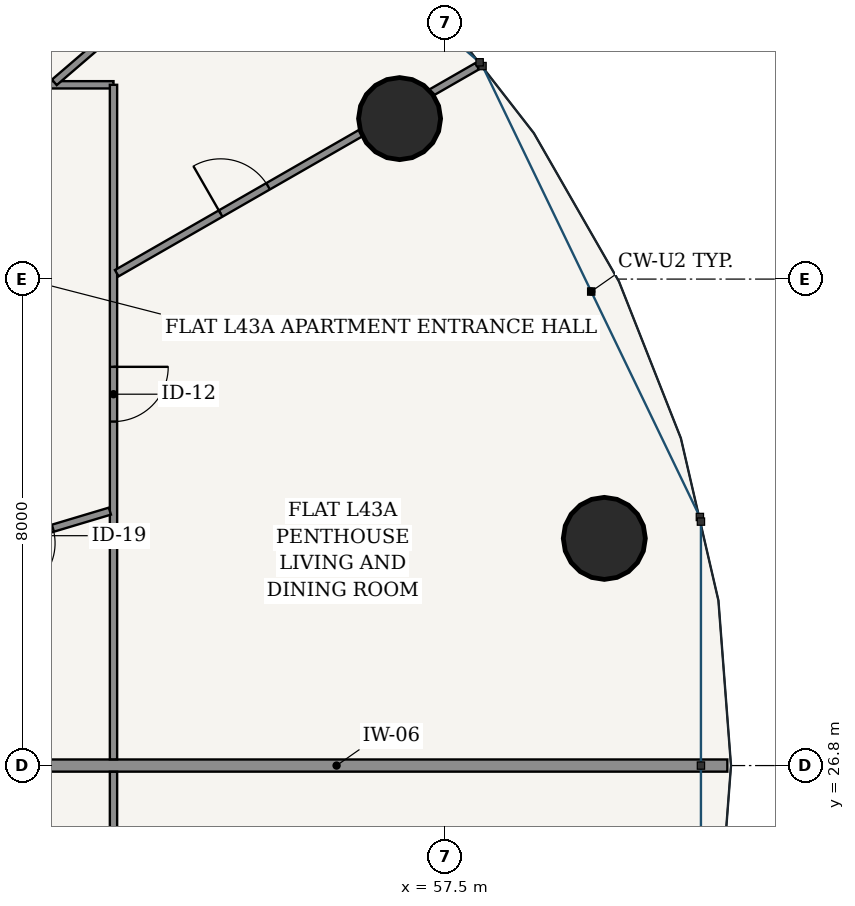
"""IFC4 building model, lengths in metres.
Left out: names, types, materials, properties, quantities, classifications, styles, units other than length and angle.
Written with IfcOpenShell. Run it as: python <this file> out.ifc"""

import sys

from ifc_helpers import new_model, si_unit, direction, frame, frame_2d, origin, origin_2d, place, context, subcontext, project, spatial, rectangle, hollow_circle, extrude, source, transform, mapped, element, fill, save


model = new_model("IFC4")
c1 = context("Model", 3, precision=1e-05, world=origin(), true_north=direction((-0.2419218956, 0.970295726276)))
c2 = subcontext(c1, "Body", "Model", "MODEL_VIEW")
j1 = project(units=[si_unit("LENGTHUNIT", "METRE"), si_unit("PLANEANGLEUNIT", "RADIAN")], contexts=[c1])
p1 = place(None, origin())
s1 = spatial("IfcSite", under=j1, at=p1, CompositionType="ELEMENT")
p2 = place(p1, origin())
s2 = spatial("IfcBuilding", under=s1, at=p2, CompositionType="ELEMENT")
p3 = place(p2, frame((0.0, 0.0, 164.2)))
s3 = spatial("IfcBuildingStorey", under=s2, at=p3, CompositionType="ELEMENT", Elevation=164.2)
for number, where, z_axis, x_axis in (
    (1, (60.117, 30.536, 0.0), (0.0, 0.0, 1.0), (1.0, 0.0, 0.0)),
    (2, (56.75, 37.439, 0.0), (0.0, 0.0, 1.0), (1.0, 0.0, 0.0)),
):
    element("IfcColumn", number, at=place(p3, frame(where, z_axis=z_axis, x_axis=x_axis)), inside=s3, PredefinedType="COLUMN", context=c2, shape_type="SweptSolid", body=[
        extrude(hollow_circle(Radius=0.675, WallThickness=0.042, at=origin_2d()), origin(), (0.0, 0.0, 1.0), 3.6),
    ])
p4 = place(p3, frame((49.287, 26.8, 0.0), z_axis=(0.0, 0.0, 1.0), x_axis=(1.0, 0.0, 0.0)))
e3 = element("IfcWall", 3, at=p4, inside=s3, PredefinedType="PARTITIONING", context=c2, shape_type="SweptSolid", body=[
    extrude(rectangle(XDim=12.853, YDim=0.2, at=frame_2d((6.426, 0.0))), origin(), (0.0, 0.0, 1.0), 2.846),
])
p5 = place(p3, frame((44.355, 37.995, 0.0), z_axis=(0.0, 0.0, 1.0), x_axis=(1.0, 0.0, 0.0)))
e4 = element("IfcWall", 4, at=p5, inside=s3, PredefinedType="PARTITIONING", context=c2, shape_type="SweptSolid", body=[
    extrude(rectangle(XDim=7.69, YDim=0.12, at=frame_2d((3.845, 0.0))), origin(), (0.0, 0.0, 1.0), 2.776),
])
p6 = place(p5, frame((0.887, 0.0, 0.0)))
e5 = element("IfcOpeningElement", 5, at=p6, cuts=e4, PredefinedType="OPENING", context=c2, shape_type="SweptSolid", body=[
    extrude(rectangle(XDim=0.9, YDim=2.15, at=frame_2d((0.45, 1.075))), frame((0.0, 0.07, 0.0), z_axis=(0.0, -1.0, 0.0), x_axis=(1.0, 0.0, 0.0)), (0.0, 0.0, 1.0), 0.14),
])
p7 = place(p3, frame((52.045, 37.995, 0.0), z_axis=(0.0, 0.0, 1.0), x_axis=(0.0, -1.0, 0.0)))
e6 = element("IfcWall", 6, at=p7, inside=s3, PredefinedType="PARTITIONING", context=c2, shape_type="SweptSolid", body=[
    extrude(rectangle(XDim=11.093, YDim=0.12, at=frame_2d((5.546, 0.0))), origin(), (0.0, 0.0, 1.0), 2.776),
])
p8 = place(p7, frame((4.638, 0.0, 0.0)))
e7 = element("IfcOpeningElement", 7, at=p8, cuts=e6, PredefinedType="OPENING", context=c2, shape_type="SweptSolid", body=[
    extrude(rectangle(XDim=0.9, YDim=2.15, at=frame_2d((0.45, 1.075))), frame((0.0, 0.07, 0.0), z_axis=(0.0, -1.0, 0.0), x_axis=(1.0, 0.0, 0.0)), (0.0, 0.0, 1.0), 0.14),
])
p9 = place(p3, frame((52.099, 34.897, 0.0), z_axis=(0.0, 0.0, 1.0), x_axis=(0.867170536447, 0.498011305813, 0.0)))
e8 = element("IfcWall", 8, at=p9, inside=s3, PredefinedType="PARTITIONING", context=c2, shape_type="SweptSolid", body=[
    extrude(rectangle(XDim=6.834, YDim=0.12, at=frame_2d((3.417, 0.0))), origin(), (0.0, 0.0, 1.0), 2.776),
])
p10 = place(p9, frame((1.969, 0.0, 0.0)))
e9 = element("IfcOpeningElement", 9, at=p10, cuts=e8, PredefinedType="OPENING", context=c2, shape_type="SweptSolid", body=[
    extrude(rectangle(XDim=0.9, YDim=2.15, at=frame_2d((0.45, 1.075))), frame((0.0, 0.07, 0.0), z_axis=(0.0, -1.0, 0.0), x_axis=(1.0, 0.0, 0.0)), (0.0, 0.0, 1.0), 0.14),
])
p11 = place(p3, frame((51.072, 38.035, 0.0), z_axis=(0.0, 0.0, 1.0), x_axis=(0.758368609512, 0.65182593697, 0.0)))
e10 = element("IfcWall", 10, at=p11, inside=s3, PredefinedType="PARTITIONING", context=c2, shape_type="SweptSolid", body=[
    extrude(rectangle(XDim=5.263, YDim=0.12, at=frame_2d((2.632, 0.0))), origin(), (0.0, 0.0, 1.0), 2.846),
])
p12 = place(p3, frame((46.741, 38.044, 0.0), z_axis=(0.0, 0.0, 1.0), x_axis=(0.613770587295, 0.789484430607, 0.0)))
e11 = element("IfcWall", 11, at=p12, inside=s3, PredefinedType="PARTITIONING", context=c2, shape_type="SweptSolid", body=[
    extrude(rectangle(XDim=7.556, YDim=0.12, at=frame_2d((3.778, 0.0))), origin(), (0.0, 0.0, 1.0), 2.776),
])
p13 = place(p12, frame((2.325, 0.0, 0.0)))
e12 = element("IfcOpeningElement", 12, at=p13, cuts=e11, PredefinedType="OPENING", context=c2, shape_type="SweptSolid", body=[
    extrude(rectangle(XDim=0.9, YDim=2.15, at=frame_2d((0.45, 1.075))), frame((0.0, 0.07, 0.0), z_axis=(0.0, -1.0, 0.0), x_axis=(1.0, 0.0, 0.0)), (0.0, 0.0, 1.0), 0.14),
])
p14 = place(p3, frame((49.287, 30.177, 0.0), z_axis=(0.0, 0.0, 1.0), x_axis=(0.958045462778, 0.28661627876, 0.0)))
e13 = element("IfcWall", 13, at=p14, inside=s3, PredefinedType="PARTITIONING", context=c2, shape_type="SweptSolid", body=[
    extrude(rectangle(XDim=2.817, YDim=0.12, at=frame_2d((1.408, 0.0))), origin(), (0.0, 0.0, 1.0), 3.33),
])
p15 = place(p14, frame((0.979, 0.0, 0.0)))
e14 = element("IfcOpeningElement", 14, at=p15, cuts=e13, PredefinedType="OPENING", context=c2, shape_type="SweptSolid", body=[
    extrude(rectangle(XDim=0.86, YDim=2.15, at=frame_2d((0.43, 1.075))), frame((0.0, 0.07, 0.0), z_axis=(0.0, -1.0, 0.0), x_axis=(1.0, 0.0, 0.0)), (0.0, 0.0, 1.0), 0.14),
])
p16 = place(p3, frame((52.045, 26.698, 0.0), z_axis=(0.0, 0.0, 1.0), x_axis=(0.0, -1.0, 0.0)))
e15 = element("IfcWall", 15, at=p16, inside=s3, PredefinedType="PARTITIONING", context=c2, shape_type="SweptSolid", body=[
    extrude(rectangle(XDim=12.943, YDim=0.12, at=frame_2d((6.472, 0.0))), origin(), (0.0, 0.0, 1.0), 2.776),
])
p17 = place(p16, frame((8.503, 0.0, 0.0)))
e16 = element("IfcOpeningElement", 16, at=p17, cuts=e15, PredefinedType="OPENING", context=c2, shape_type="SweptSolid", body=[
    extrude(rectangle(XDim=0.9, YDim=2.15, at=frame_2d((0.45, 1.075))), frame((0.0, 0.07, 0.0), z_axis=(0.0, -1.0, 0.0), x_axis=(1.0, 0.0, 0.0)), (0.0, 0.0, 1.0), 0.14),
])
m1 = source(origin(), c2, "Body", "SweptSolid", [
    extrude(rectangle(XDim=0.86, YDim=2.15, at=frame_2d((0.43, 1.075))), frame((0.0, 0.025, 0.0), z_axis=(0.0, -1.0, 0.0), x_axis=(1.0, 0.0, 0.0)), (0.0, 0.0, 1.0), 0.05),
])
p18 = place(p15, frame((0.86, 0.0, 0.0), z_axis=(0.0, 0.0, 1.0), x_axis=(-1.0, 0.0, 0.0)))
e17 = element("IfcDoor", 17, at=p18, inside=s3, OperationType="SINGLE_SWING_RIGHT", PredefinedType="DOOR", context=c2, shape_type="MappedRepresentation", body=[
    mapped(m1, transform((0.0, 0.0, 0.0), scale=1.0)),
])
fill(e14, e17)
m2 = source(origin(), c2, "Body", "SweptSolid", [
    extrude(rectangle(XDim=0.9, YDim=2.15, at=frame_2d((0.45, 1.075))), frame((0.0, 0.025, 0.0), z_axis=(0.0, -1.0, 0.0), x_axis=(1.0, 0.0, 0.0)), (0.0, 0.0, 1.0), 0.05),
])
p19 = place(p8, origin())
e18 = element("IfcDoor", 18, at=p19, inside=s3, OperationType="SINGLE_SWING_LEFT", PredefinedType="DOOR", context=c2, shape_type="MappedRepresentation", body=[
    mapped(m2, transform((0.0, 0.0, 0.0), scale=1.0)),
])
fill(e7, e18)
p20 = place(p10, origin())
e19 = element("IfcDoor", 19, at=p20, inside=s3, OperationType="SINGLE_SWING_LEFT", PredefinedType="DOOR", context=c2, shape_type="MappedRepresentation", body=[
    mapped(m2, transform((0.0, 0.0, 0.0), scale=1.0)),
])
fill(e9, e19)
save(model, sys.argv[1])
